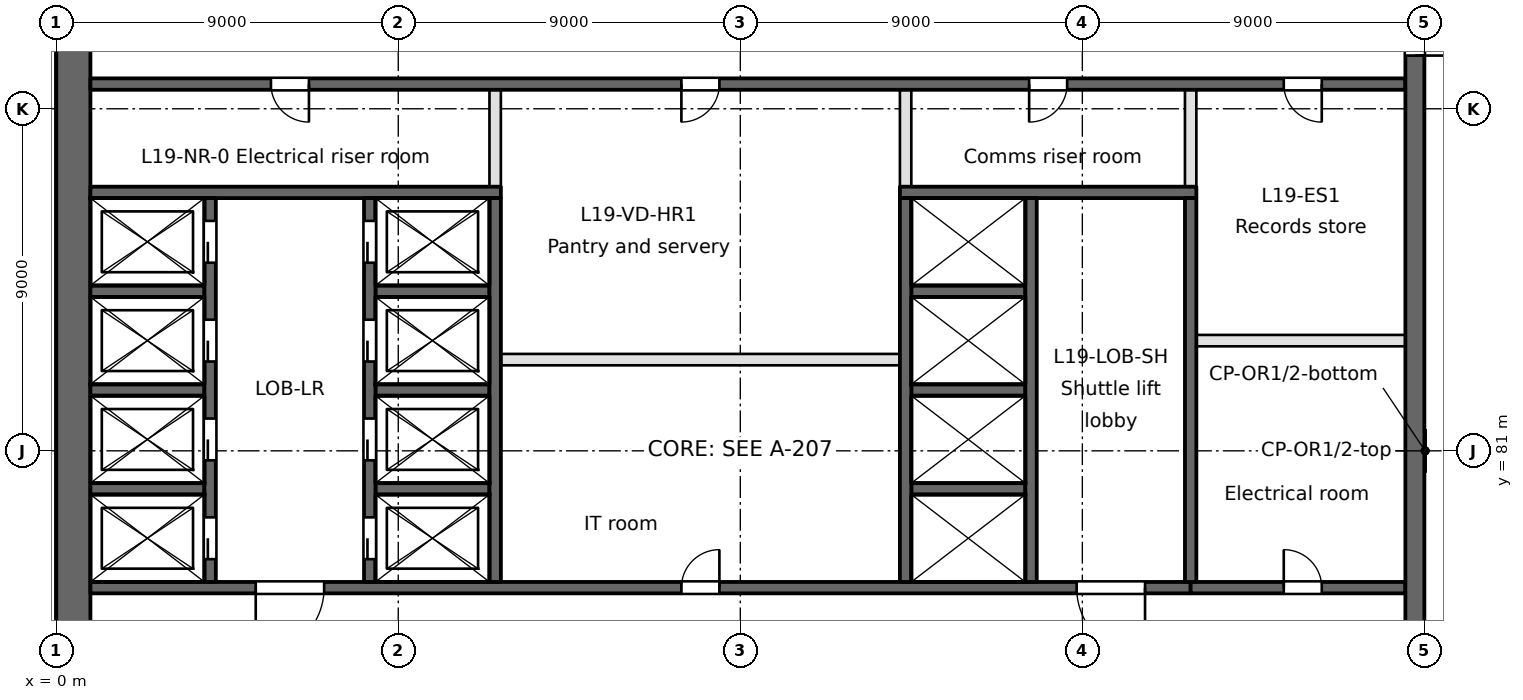
"""IFC4 building model, lengths in metres.
Left out: names, types, materials, properties, quantities, classifications, styles, units other than length and angle.
Written with IfcOpenShell. Run it as: python <this file> out.ifc"""

import sys

from ifc_helpers import new_model, si_unit, direction, frame, frame_2d, origin, place, context, subcontext, project, spatial, rectangle, extrude, element, fill, save


model = new_model("IFC4")
c1 = context("Model", 3, precision=1e-05, world=origin(), true_north=direction((0.0, 1.0)))
c2 = subcontext(c1, "Body", "Model", "MODEL_VIEW")
j1 = project(units=[si_unit("LENGTHUNIT", "METRE"), si_unit("PLANEANGLEUNIT", "RADIAN")], contexts=[c1])
p1 = place(None, origin())
s1 = spatial("IfcSite", under=j1, at=p1, CompositionType="ELEMENT")
p2 = place(p1, origin())
s2 = spatial("IfcBuilding", under=s1, at=p2, CompositionType="ELEMENT")
p3 = place(p2, frame((0.0, 0.0, 80.2)))
s3 = spatial("IfcBuildingStorey", under=s2, at=p3, CompositionType="ELEMENT", Elevation=80.2)
p4 = place(p3, frame((0.45, 94.5, 0.0), z_axis=(0.0, 0.0, 1.0), x_axis=(0.0, -1.0, 0.0)))
e1 = element("IfcWall", 1, at=p4, inside=s3, PredefinedType="SHEAR", context=c2, shape_type="SweptSolid", body=[
    extrude(rectangle(XDim=66.187, YDim=0.9, at=frame_2d((33.094, 0.0))), origin(), (0.0, 0.0, 1.0), 4.6),
])
p5 = place(p3, frame((0.9, 77.4, -0.45), z_axis=(0.0, 0.0, 1.0), x_axis=(1.0, 0.0, 0.0)))
e2 = element("IfcWall", 2, at=p5, inside=s3, PredefinedType="SOLIDWALL", context=c2, shape_type="SweptSolid", body=[
    extrude(rectangle(XDim=28.95, YDim=0.3, at=frame_2d((14.475, 0.0))), origin(), (0.0, 0.0, 1.0), 4.65),
])
p6 = place(p5, frame((4.35, 0.0, 0.45)))
e3 = element("IfcOpeningElement", 3, at=p6, cuts=e2, PredefinedType="OPENING", context=c2, shape_type="SweptSolid", body=[
    extrude(rectangle(XDim=1.8, YDim=2.1, at=frame_2d((0.9, 1.05))), frame((0.0, 0.15, 0.0), z_axis=(0.0, -1.0, 0.0), x_axis=(1.0, 0.0, 0.0)), (0.0, 0.0, 1.0), 0.3),
])
p7 = place(p5, frame((25.95, 0.0, 0.45)))
e4 = element("IfcOpeningElement", 4, at=p7, cuts=e2, PredefinedType="OPENING", context=c2, shape_type="SweptSolid", body=[
    extrude(rectangle(XDim=1.8, YDim=2.1, at=frame_2d((0.9, 1.05))), frame((0.0, 0.15, 0.0), z_axis=(0.0, -1.0, 0.0), x_axis=(1.0, 0.0, 0.0)), (0.0, 0.0, 1.0), 0.3),
])
p8 = place(p5, frame((15.55, 0.0, 0.45)))
e5 = element("IfcOpeningElement", 5, at=p8, cuts=e2, PredefinedType="OPENING", context=c2, shape_type="SweptSolid", body=[
    extrude(rectangle(XDim=1.0, YDim=2.1, at=frame_2d((0.5, 1.05))), frame((0.0, 0.15, 0.0), z_axis=(0.0, -1.0, 0.0), x_axis=(1.0, 0.0, 0.0)), (0.0, 0.0, 1.0), 0.3),
])
p9 = place(p3, frame((29.85, 77.4, 0.0), z_axis=(0.0, 0.0, 1.0), x_axis=(1.0, 0.0, 0.0)))
e6 = element("IfcWall", 6, at=p9, inside=s3, PredefinedType="SOLIDWALL", context=c2, shape_type="SweptSolid", body=[
    extrude(rectangle(XDim=5.65, YDim=0.3, at=frame_2d((2.825, 0.0))), origin(), (0.0, 0.0, 1.0), 4.2),
])
p10 = place(p9, frame((2.45, 0.0, 0.0)))
e7 = element("IfcOpeningElement", 7, at=p10, cuts=e6, PredefinedType="OPENING", context=c2, shape_type="SweptSolid", body=[
    extrude(rectangle(XDim=1.0, YDim=2.1, at=frame_2d((0.5, 1.05))), frame((0.0, 0.15, 0.0), z_axis=(0.0, -1.0, 0.0), x_axis=(1.0, 0.0, 0.0)), (0.0, 0.0, 1.0), 0.3),
])
for number, where, z_axis, x_axis in (
    (8, (0.9, 80.0, -0.45), (0.0, 0.0, 1.0), (1.0, 0.0, 0.0)),
    (9, (8.4, 80.0, -0.45), (0.0, 0.0, 1.0), (1.0, 0.0, 0.0)),
    (10, (22.5, 80.0, -0.45), (0.0, 0.0, 1.0), (1.0, 0.0, 0.0)),
    (11, (0.9, 82.6, -0.45), (0.0, 0.0, 1.0), (1.0, 0.0, 0.0)),
    (12, (8.4, 82.6, -0.45), (0.0, 0.0, 1.0), (1.0, 0.0, 0.0)),
    (13, (22.5, 82.6, -0.45), (0.0, 0.0, 1.0), (1.0, 0.0, 0.0)),
):
    element("IfcWall", number, at=place(p3, frame(where, z_axis=z_axis, x_axis=x_axis)), inside=s3, PredefinedType="SOLIDWALL", context=c2, shape_type="SweptSolid", body=[
        extrude(rectangle(XDim=3.0, YDim=0.3, at=frame_2d((1.5, 0.0))), origin(), (0.0, 0.0, 1.0), 4.65),
    ])
p11 = place(p3, frame((11.7, 83.4, 0.0), z_axis=(0.0, 0.0, 1.0), x_axis=(1.0, 0.0, 0.0)))
e14 = element("IfcWall", 14, at=p11, inside=s3, PredefinedType="PARTITIONING", context=c2, shape_type="SweptSolid", body=[
    extrude(rectangle(XDim=10.5, YDim=0.3, at=frame_2d((5.25, 0.0))), origin(), (0.0, 0.0, 1.0), 4.2),
])
p12 = place(p3, frame((30.0, 83.9, 0.0), z_axis=(0.0, 0.0, 1.0), x_axis=(1.0, 0.0, 0.0)))
e15 = element("IfcWall", 15, at=p12, inside=s3, PredefinedType="PARTITIONING", context=c2, shape_type="SweptSolid", body=[
    extrude(rectangle(XDim=5.5, YDim=0.3, at=frame_2d((2.75, 0.0))), origin(), (0.0, 0.0, 1.0), 4.2),
])
for number, where, z_axis, x_axis in (
    (16, (0.9, 85.2, -0.45), (0.0, 0.0, 1.0), (1.0, 0.0, 0.0)),
    (17, (8.4, 85.2, -0.45), (0.0, 0.0, 1.0), (1.0, 0.0, 0.0)),
    (18, (22.5, 85.2, -0.45), (0.0, 0.0, 1.0), (1.0, 0.0, 0.0)),
):
    element("IfcWall", number, at=place(p3, frame(where, z_axis=z_axis, x_axis=x_axis)), inside=s3, PredefinedType="SOLIDWALL", context=c2, shape_type="SweptSolid", body=[
        extrude(rectangle(XDim=3.0, YDim=0.3, at=frame_2d((1.5, 0.0))), origin(), (0.0, 0.0, 1.0), 4.65),
    ])
p13 = place(p3, frame((0.9, 87.8, -0.45), z_axis=(0.0, 0.0, 1.0), x_axis=(1.0, 0.0, 0.0)))
e19 = element("IfcWall", 19, at=p13, inside=s3, PredefinedType="SOLIDWALL", context=c2, shape_type="SweptSolid", body=[
    extrude(rectangle(XDim=10.8, YDim=0.3, at=frame_2d((5.4, 0.0))), origin(), (0.0, 0.0, 1.0), 4.65),
])
p14 = place(p3, frame((22.2, 87.8, -0.45), z_axis=(0.0, 0.0, 1.0), x_axis=(1.0, 0.0, 0.0)))
e20 = element("IfcWall", 20, at=p14, inside=s3, PredefinedType="SOLIDWALL", context=c2, shape_type="SweptSolid", body=[
    extrude(rectangle(XDim=7.8, YDim=0.3, at=frame_2d((3.9, 0.0))), origin(), (0.0, 0.0, 1.0), 4.65),
])
p15 = place(p3, frame((0.9, 90.65, -0.45), z_axis=(0.0, 0.0, 1.0), x_axis=(1.0, 0.0, 0.0)))
e21 = element("IfcWall", 21, at=p15, inside=s3, PredefinedType="SOLIDWALL", context=c2, shape_type="SweptSolid", body=[
    extrude(rectangle(XDim=34.6, YDim=0.3, at=frame_2d((17.3, 0.0))), origin(), (0.0, 0.0, 1.0), 4.65),
])
p16 = place(p15, frame((4.75, 0.0, 0.45)))
e22 = element("IfcOpeningElement", 22, at=p16, cuts=e21, PredefinedType="OPENING", context=c2, shape_type="SweptSolid", body=[
    extrude(rectangle(XDim=1.0, YDim=2.1, at=frame_2d((0.5, 1.05))), frame((0.0, 0.15, 0.0), z_axis=(0.0, -1.0, 0.0), x_axis=(1.0, 0.0, 0.0)), (0.0, 0.0, 1.0), 0.3),
])
p17 = place(p15, frame((24.7, 0.0, 0.45)))
e23 = element("IfcOpeningElement", 23, at=p17, cuts=e21, PredefinedType="OPENING", context=c2, shape_type="SweptSolid", body=[
    extrude(rectangle(XDim=1.0, YDim=2.1, at=frame_2d((0.5, 1.05))), frame((0.0, 0.15, 0.0), z_axis=(0.0, -1.0, 0.0), x_axis=(1.0, 0.0, 0.0)), (0.0, 0.0, 1.0), 0.3),
])
p18 = place(p15, frame((15.55, 0.0, 0.45)))
e24 = element("IfcOpeningElement", 24, at=p18, cuts=e21, PredefinedType="OPENING", context=c2, shape_type="SweptSolid", body=[
    extrude(rectangle(XDim=1.0, YDim=2.1, at=frame_2d((0.5, 1.05))), frame((0.0, 0.15, 0.0), z_axis=(0.0, -1.0, 0.0), x_axis=(1.0, 0.0, 0.0)), (0.0, 0.0, 1.0), 0.3),
])
p19 = place(p15, frame((31.4, 0.0, 0.45)))
e25 = element("IfcOpeningElement", 25, at=p19, cuts=e21, PredefinedType="OPENING", context=c2, shape_type="SweptSolid", body=[
    extrude(rectangle(XDim=1.0, YDim=2.1, at=frame_2d((0.5, 1.05))), frame((0.0, 0.15, 0.0), z_axis=(0.0, -1.0, 0.0), x_axis=(1.0, 0.0, 0.0)), (0.0, 0.0, 1.0), 0.3),
])
p20 = place(p3, frame((4.05, 77.55, -0.45), z_axis=(0.0, 0.0, 1.0), x_axis=(0.0, 1.0, 0.0)))
e26 = element("IfcWall", 26, at=p20, inside=s3, PredefinedType="SOLIDWALL", context=c2, shape_type="SweptSolid", body=[
    extrude(rectangle(XDim=10.1, YDim=0.3, at=frame_2d((5.05, 0.0))), origin(), (0.0, 0.0, 1.0), 4.65),
])
p21 = place(p20, frame((0.6, 0.0, 0.45)))
e27 = element("IfcOpeningElement", 27, at=p21, cuts=e26, PredefinedType="OPENING", context=c2, shape_type="SweptSolid", body=[
    extrude(rectangle(XDim=1.1, YDim=2.1, at=frame_2d((0.55, 1.05))), frame((0.0, 0.15, 0.0), z_axis=(0.0, -1.0, 0.0), x_axis=(1.0, 0.0, 0.0)), (0.0, 0.0, 1.0), 0.3),
])
p22 = place(p20, frame((3.2, 0.0, 0.45)))
e28 = element("IfcOpeningElement", 28, at=p22, cuts=e26, PredefinedType="OPENING", context=c2, shape_type="SweptSolid", body=[
    extrude(rectangle(XDim=1.1, YDim=2.1, at=frame_2d((0.55, 1.05))), frame((0.0, 0.15, 0.0), z_axis=(0.0, -1.0, 0.0), x_axis=(1.0, 0.0, 0.0)), (0.0, 0.0, 1.0), 0.3),
])
p23 = place(p20, frame((5.8, 0.0, 0.45)))
e29 = element("IfcOpeningElement", 29, at=p23, cuts=e26, PredefinedType="OPENING", context=c2, shape_type="SweptSolid", body=[
    extrude(rectangle(XDim=1.1, YDim=2.1, at=frame_2d((0.55, 1.05))), frame((0.0, 0.15, 0.0), z_axis=(0.0, -1.0, 0.0), x_axis=(1.0, 0.0, 0.0)), (0.0, 0.0, 1.0), 0.3),
])
p24 = place(p20, frame((8.4, 0.0, 0.45)))
e30 = element("IfcOpeningElement", 30, at=p24, cuts=e26, PredefinedType="OPENING", context=c2, shape_type="SweptSolid", body=[
    extrude(rectangle(XDim=1.1, YDim=2.1, at=frame_2d((0.55, 1.05))), frame((0.0, 0.15, 0.0), z_axis=(0.0, -1.0, 0.0), x_axis=(1.0, 0.0, 0.0)), (0.0, 0.0, 1.0), 0.3),
])
p25 = place(p3, frame((8.25, 77.55, -0.45), z_axis=(0.0, 0.0, 1.0), x_axis=(0.0, 1.0, 0.0)))
e31 = element("IfcWall", 31, at=p25, inside=s3, PredefinedType="SOLIDWALL", context=c2, shape_type="SweptSolid", body=[
    extrude(rectangle(XDim=10.1, YDim=0.3, at=frame_2d((5.05, 0.0))), origin(), (0.0, 0.0, 1.0), 4.65),
])
p26 = place(p25, frame((0.6, 0.0, 0.45)))
e32 = element("IfcOpeningElement", 32, at=p26, cuts=e31, PredefinedType="OPENING", context=c2, shape_type="SweptSolid", body=[
    extrude(rectangle(XDim=1.1, YDim=2.1, at=frame_2d((0.55, 1.05))), frame((0.0, 0.15, 0.0), z_axis=(0.0, -1.0, 0.0), x_axis=(1.0, 0.0, 0.0)), (0.0, 0.0, 1.0), 0.3),
])
p27 = place(p25, frame((3.2, 0.0, 0.45)))
e33 = element("IfcOpeningElement", 33, at=p27, cuts=e31, PredefinedType="OPENING", context=c2, shape_type="SweptSolid", body=[
    extrude(rectangle(XDim=1.1, YDim=2.1, at=frame_2d((0.55, 1.05))), frame((0.0, 0.15, 0.0), z_axis=(0.0, -1.0, 0.0), x_axis=(1.0, 0.0, 0.0)), (0.0, 0.0, 1.0), 0.3),
])
p28 = place(p25, frame((5.8, 0.0, 0.45)))
e34 = element("IfcOpeningElement", 34, at=p28, cuts=e31, PredefinedType="OPENING", context=c2, shape_type="SweptSolid", body=[
    extrude(rectangle(XDim=1.1, YDim=2.1, at=frame_2d((0.55, 1.05))), frame((0.0, 0.15, 0.0), z_axis=(0.0, -1.0, 0.0), x_axis=(1.0, 0.0, 0.0)), (0.0, 0.0, 1.0), 0.3),
])
p29 = place(p25, frame((8.4, 0.0, 0.45)))
e35 = element("IfcOpeningElement", 35, at=p29, cuts=e31, PredefinedType="OPENING", context=c2, shape_type="SweptSolid", body=[
    extrude(rectangle(XDim=1.1, YDim=2.1, at=frame_2d((0.55, 1.05))), frame((0.0, 0.15, 0.0), z_axis=(0.0, -1.0, 0.0), x_axis=(1.0, 0.0, 0.0)), (0.0, 0.0, 1.0), 0.3),
])
p30 = place(p3, frame((11.55, 77.55, -0.45), z_axis=(0.0, 0.0, 1.0), x_axis=(0.0, 1.0, 0.0)))
e36 = element("IfcWall", 36, at=p30, inside=s3, PredefinedType="SOLIDWALL", context=c2, shape_type="SweptSolid", body=[
    extrude(rectangle(XDim=10.1, YDim=0.3, at=frame_2d((5.05, 0.0))), origin(), (0.0, 0.0, 1.0), 4.65),
])
p31 = place(p3, frame((11.55, 87.95, 0.0), z_axis=(0.0, 0.0, 1.0), x_axis=(0.0, 1.0, 0.0)))
e37 = element("IfcWall", 37, at=p31, inside=s3, PredefinedType="PARTITIONING", context=c2, shape_type="SweptSolid", body=[
    extrude(rectangle(XDim=2.55, YDim=0.3, at=frame_2d((1.275, 0.0))), origin(), (0.0, 0.0, 1.0), 4.2),
])
p32 = place(p3, frame((22.35, 77.55, -0.45), z_axis=(0.0, 0.0, 1.0), x_axis=(0.0, 1.0, 0.0)))
e38 = element("IfcWall", 38, at=p32, inside=s3, PredefinedType="SOLIDWALL", context=c2, shape_type="SweptSolid", body=[
    extrude(rectangle(XDim=10.1, YDim=0.3, at=frame_2d((5.05, 0.0))), origin(), (0.0, 0.0, 1.0), 4.65),
])
p33 = place(p3, frame((22.35, 87.95, 0.0), z_axis=(0.0, 0.0, 1.0), x_axis=(0.0, 1.0, 0.0)))
e39 = element("IfcWall", 39, at=p33, inside=s3, PredefinedType="PARTITIONING", context=c2, shape_type="SweptSolid", body=[
    extrude(rectangle(XDim=2.55, YDim=0.3, at=frame_2d((1.275, 0.0))), origin(), (0.0, 0.0, 1.0), 4.2),
])
for number, where, z_axis, x_axis in (
    (40, (25.65, 77.55, -0.45), (0.0, 0.0, 1.0), (0.0, 1.0, 0.0)),
    (41, (29.85, 77.55, -0.45), (0.0, 0.0, 1.0), (0.0, 1.0, 0.0)),
):
    element("IfcWall", number, at=place(p3, frame(where, z_axis=z_axis, x_axis=x_axis)), inside=s3, PredefinedType="SOLIDWALL", context=c2, shape_type="SweptSolid", body=[
        extrude(rectangle(XDim=10.1, YDim=0.3, at=frame_2d((5.05, 0.0))), origin(), (0.0, 0.0, 1.0), 4.65),
    ])
p34 = place(p3, frame((29.85, 87.95, 0.0), z_axis=(0.0, 0.0, 1.0), x_axis=(0.0, 1.0, 0.0)))
e42 = element("IfcWall", 42, at=p34, inside=s3, PredefinedType="PARTITIONING", context=c2, shape_type="SweptSolid", body=[
    extrude(rectangle(XDim=2.55, YDim=0.3, at=frame_2d((1.275, 0.0))), origin(), (0.0, 0.0, 1.0), 4.2),
])
p35 = place(p3, frame((35.75, 63.5, -0.45), z_axis=(0.0, 0.0, 1.0), x_axis=(0.0, 1.0, 0.0)))
e43 = element("IfcWall", 43, at=p35, inside=s3, PredefinedType="SOLIDWALL", context=c2, shape_type="SweptSolid", body=[
    extrude(rectangle(XDim=34.6, YDim=0.5, at=frame_2d((17.3, 0.0))), origin(), (0.0, 0.0, 1.0), 4.65),
])
p36 = place(p35, frame((9.7, 0.0, 0.45)))
e44 = element("IfcOpeningElement", 44, at=p36, cuts=e43, PredefinedType="OPENING", context=c2, shape_type="SweptSolid", body=[
    extrude(rectangle(XDim=2.4, YDim=2.1, at=frame_2d((1.2, 1.05))), frame((0.0, 0.25, 0.0), z_axis=(0.0, -1.0, 0.0), x_axis=(1.0, 0.0, 0.0)), (0.0, 0.0, 1.0), 0.5),
])
p37 = place(p35, frame((27.9, 0.0, 0.45)))
e45 = element("IfcOpeningElement", 45, at=p37, cuts=e43, PredefinedType="OPENING", context=c2, shape_type="SweptSolid", body=[
    extrude(rectangle(XDim=1.5, YDim=2.1, at=frame_2d((0.75, 1.05))), frame((0.0, 0.25, 0.0), z_axis=(0.0, -1.0, 0.0), x_axis=(1.0, 0.0, 0.0)), (0.0, 0.0, 1.0), 0.5),
])
p38 = place(p35, frame((1.5, 0.0, 0.45)))
e46 = element("IfcOpeningElement", 46, at=p38, cuts=e43, PredefinedType="OPENING", context=c2, shape_type="SweptSolid", body=[
    extrude(rectangle(XDim=1.2, YDim=2.1, at=frame_2d((0.6, 1.05))), frame((0.0, 0.25, 0.0), z_axis=(0.0, -1.0, 0.0), x_axis=(1.0, 0.0, 0.0)), (0.0, 0.0, 1.0), 0.5),
])
p39 = place(p21, origin())
e47 = element("IfcDoor", 47, at=p39, inside=s3, OperationType="SLIDING_TO_RIGHT", PredefinedType="DOOR", context=c2, shape_type="SweptSolid", body=[
    extrude(rectangle(XDim=1.1, YDim=2.1, at=frame_2d((0.55, 1.05))), frame((0.0, 0.025, 0.0), z_axis=(0.0, -1.0, 0.0), x_axis=(1.0, 0.0, 0.0)), (0.0, 0.0, 1.0), 0.05),
])
fill(e27, e47)
p40 = place(p22, origin())
e48 = element("IfcDoor", 48, at=p40, inside=s3, OperationType="SLIDING_TO_LEFT", PredefinedType="DOOR", context=c2, shape_type="SweptSolid", body=[
    extrude(rectangle(XDim=1.1, YDim=2.1, at=frame_2d((0.55, 1.05))), frame((0.0, 0.025, 0.0), z_axis=(0.0, -1.0, 0.0), x_axis=(1.0, 0.0, 0.0)), (0.0, 0.0, 1.0), 0.05),
])
fill(e28, e48)
p41 = place(p23, origin())
e49 = element("IfcDoor", 49, at=p41, inside=s3, OperationType="SLIDING_TO_RIGHT", PredefinedType="DOOR", context=c2, shape_type="SweptSolid", body=[
    extrude(rectangle(XDim=1.1, YDim=2.1, at=frame_2d((0.55, 1.05))), frame((0.0, 0.025, 0.0), z_axis=(0.0, -1.0, 0.0), x_axis=(1.0, 0.0, 0.0)), (0.0, 0.0, 1.0), 0.05),
])
fill(e29, e49)
p42 = place(p24, origin())
e50 = element("IfcDoor", 50, at=p42, inside=s3, OperationType="SLIDING_TO_LEFT", PredefinedType="DOOR", context=c2, shape_type="SweptSolid", body=[
    extrude(rectangle(XDim=1.1, YDim=2.1, at=frame_2d((0.55, 1.05))), frame((0.0, 0.025, 0.0), z_axis=(0.0, -1.0, 0.0), x_axis=(1.0, 0.0, 0.0)), (0.0, 0.0, 1.0), 0.05),
])
fill(e30, e50)
p43 = place(p26, origin())
e51 = element("IfcDoor", 51, at=p43, inside=s3, OperationType="SLIDING_TO_RIGHT", PredefinedType="DOOR", context=c2, shape_type="SweptSolid", body=[
    extrude(rectangle(XDim=1.1, YDim=2.1, at=frame_2d((0.55, 1.05))), frame((0.0, 0.025, 0.0), z_axis=(0.0, -1.0, 0.0), x_axis=(1.0, 0.0, 0.0)), (0.0, 0.0, 1.0), 0.05),
])
fill(e32, e51)
p44 = place(p27, origin())
e52 = element("IfcDoor", 52, at=p44, inside=s3, OperationType="SLIDING_TO_LEFT", PredefinedType="DOOR", context=c2, shape_type="SweptSolid", body=[
    extrude(rectangle(XDim=1.1, YDim=2.1, at=frame_2d((0.55, 1.05))), frame((0.0, 0.025, 0.0), z_axis=(0.0, -1.0, 0.0), x_axis=(1.0, 0.0, 0.0)), (0.0, 0.0, 1.0), 0.05),
])
fill(e33, e52)
p45 = place(p28, origin())
e53 = element("IfcDoor", 53, at=p45, inside=s3, OperationType="SLIDING_TO_RIGHT", PredefinedType="DOOR", context=c2, shape_type="SweptSolid", body=[
    extrude(rectangle(XDim=1.1, YDim=2.1, at=frame_2d((0.55, 1.05))), frame((0.0, 0.025, 0.0), z_axis=(0.0, -1.0, 0.0), x_axis=(1.0, 0.0, 0.0)), (0.0, 0.0, 1.0), 0.05),
])
fill(e34, e53)
p46 = place(p29, origin())
e54 = element("IfcDoor", 54, at=p46, inside=s3, OperationType="SLIDING_TO_LEFT", PredefinedType="DOOR", context=c2, shape_type="SweptSolid", body=[
    extrude(rectangle(XDim=1.1, YDim=2.1, at=frame_2d((0.55, 1.05))), frame((0.0, 0.025, 0.0), z_axis=(0.0, -1.0, 0.0), x_axis=(1.0, 0.0, 0.0)), (0.0, 0.0, 1.0), 0.05),
])
fill(e35, e54)
p47 = place(p6, frame((1.8, 0.0, 0.0), z_axis=(0.0, 0.0, 1.0), x_axis=(-1.0, 0.0, 0.0)))
e55 = element("IfcDoor", 55, at=p47, inside=s3, OperationType="SINGLE_SWING_RIGHT", PredefinedType="DOOR", context=c2, shape_type="SweptSolid", body=[
    extrude(rectangle(XDim=1.8, YDim=2.1, at=frame_2d((0.9, 1.05))), frame((0.0, 0.025, 0.0), z_axis=(0.0, -1.0, 0.0), x_axis=(1.0, 0.0, 0.0)), (0.0, 0.0, 1.0), 0.05),
])
fill(e3, e55)
p48 = place(p7, frame((1.8, 0.0, 0.0), z_axis=(0.0, 0.0, 1.0), x_axis=(-1.0, 0.0, 0.0)))
e56 = element("IfcDoor", 56, at=p48, inside=s3, OperationType="SINGLE_SWING_LEFT", PredefinedType="DOOR", context=c2, shape_type="SweptSolid", body=[
    extrude(rectangle(XDim=1.8, YDim=2.1, at=frame_2d((0.9, 1.05))), frame((0.0, 0.025, 0.0), z_axis=(0.0, -1.0, 0.0), x_axis=(1.0, 0.0, 0.0)), (0.0, 0.0, 1.0), 0.05),
])
fill(e4, e56)
p49 = place(p37, frame((1.5, 0.0, 0.0), z_axis=(0.0, 0.0, 1.0), x_axis=(-1.0, 0.0, 0.0)))
e57 = element("IfcDoor", 57, at=p49, inside=s3, OperationType="SINGLE_SWING_RIGHT", PredefinedType="DOOR", context=c2, shape_type="SweptSolid", body=[
    extrude(rectangle(XDim=1.5, YDim=2.1, at=frame_2d((0.75, 1.05))), frame((0.0, 0.025, 0.0), z_axis=(0.0, -1.0, 0.0), x_axis=(1.0, 0.0, 0.0)), (0.0, 0.0, 1.0), 0.05),
])
fill(e45, e57)
p50 = place(p16, frame((1.0, 0.0, 0.0), z_axis=(0.0, 0.0, 1.0), x_axis=(-1.0, 0.0, 0.0)))
e58 = element("IfcDoor", 58, at=p50, inside=s3, OperationType="SINGLE_SWING_LEFT", PredefinedType="DOOR", context=c2, shape_type="SweptSolid", body=[
    extrude(rectangle(XDim=1.0, YDim=2.1, at=frame_2d((0.5, 1.05))), frame((0.0, 0.025, 0.0), z_axis=(0.0, -1.0, 0.0), x_axis=(1.0, 0.0, 0.0)), (0.0, 0.0, 1.0), 0.05),
])
fill(e22, e58)
p51 = place(p17, frame((1.0, 0.0, 0.0), z_axis=(0.0, 0.0, 1.0), x_axis=(-1.0, 0.0, 0.0)))
e59 = element("IfcDoor", 59, at=p51, inside=s3, OperationType="SINGLE_SWING_RIGHT", PredefinedType="DOOR", context=c2, shape_type="SweptSolid", body=[
    extrude(rectangle(XDim=1.0, YDim=2.1, at=frame_2d((0.5, 1.05))), frame((0.0, 0.025, 0.0), z_axis=(0.0, -1.0, 0.0), x_axis=(1.0, 0.0, 0.0)), (0.0, 0.0, 1.0), 0.05),
])
fill(e23, e59)
p52 = place(p8, origin())
e60 = element("IfcDoor", 60, at=p52, inside=s3, OperationType="SINGLE_SWING_RIGHT", PredefinedType="DOOR", context=c2, shape_type="SweptSolid", body=[
    extrude(rectangle(XDim=1.0, YDim=2.1, at=frame_2d((0.5, 1.05))), frame((0.0, 0.025, 0.0), z_axis=(0.0, -1.0, 0.0), x_axis=(1.0, 0.0, 0.0)), (0.0, 0.0, 1.0), 0.05),
])
fill(e5, e60)
p53 = place(p18, frame((1.0, 0.0, 0.0), z_axis=(0.0, 0.0, 1.0), x_axis=(-1.0, 0.0, 0.0)))
e61 = element("IfcDoor", 61, at=p53, inside=s3, OperationType="SINGLE_SWING_RIGHT", PredefinedType="DOOR", context=c2, shape_type="SweptSolid", body=[
    extrude(rectangle(XDim=1.0, YDim=2.1, at=frame_2d((0.5, 1.05))), frame((0.0, 0.025, 0.0), z_axis=(0.0, -1.0, 0.0), x_axis=(1.0, 0.0, 0.0)), (0.0, 0.0, 1.0), 0.05),
])
fill(e24, e61)
p54 = place(p10, origin())
e62 = element("IfcDoor", 62, at=p54, inside=s3, OperationType="SINGLE_SWING_LEFT", PredefinedType="DOOR", context=c2, shape_type="SweptSolid", body=[
    extrude(rectangle(XDim=1.0, YDim=2.1, at=frame_2d((0.5, 1.05))), frame((0.0, 0.025, 0.0), z_axis=(0.0, -1.0, 0.0), x_axis=(1.0, 0.0, 0.0)), (0.0, 0.0, 1.0), 0.05),
])
fill(e7, e62)
p55 = place(p19, frame((1.0, 0.0, 0.0), z_axis=(0.0, 0.0, 1.0), x_axis=(-1.0, 0.0, 0.0)))
e63 = element("IfcDoor", 63, at=p55, inside=s3, OperationType="SINGLE_SWING_LEFT", PredefinedType="DOOR", context=c2, shape_type="SweptSolid", body=[
    extrude(rectangle(XDim=1.0, YDim=2.1, at=frame_2d((0.5, 1.05))), frame((0.0, 0.025, 0.0), z_axis=(0.0, -1.0, 0.0), x_axis=(1.0, 0.0, 0.0)), (0.0, 0.0, 1.0), 0.05),
])
fill(e25, e63)
save(model, sys.argv[1])
